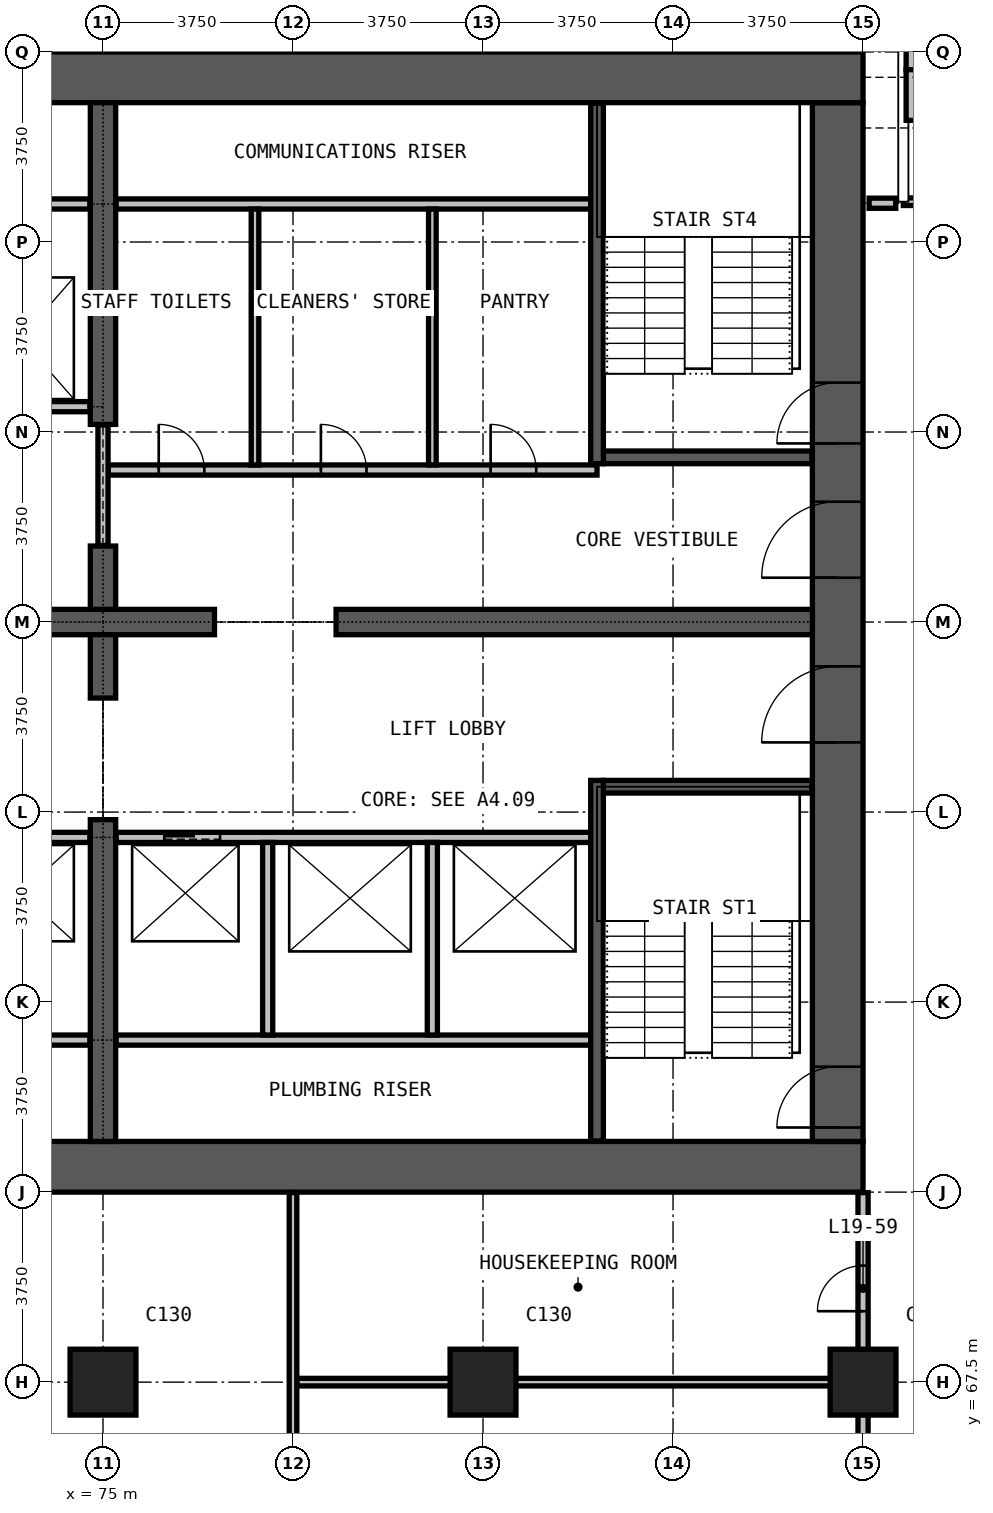
"""IFC4 building model, lengths in metres.
Left out: names, types, materials, properties, quantities, classifications, styles, units other than length and angle.
Written with IfcOpenShell. Run it as: python <this file> out.ifc"""

import sys

from ifc_helpers import new_model, si_unit, direction, frame, frame_2d, origin, origin_2d, place, context, subcontext, project, spatial, rectangle, extrude, element, fill, save


model = new_model("IFC4")
c1 = context("Model", 3, precision=1e-05, world=origin(), true_north=direction((0.0, 1.0)))
c2 = subcontext(c1, "Body", "Model", "MODEL_VIEW")
j1 = project(units=[si_unit("LENGTHUNIT", "METRE"), si_unit("PLANEANGLEUNIT", "RADIAN")], contexts=[c1])
p1 = place(None, origin())
s1 = spatial("IfcSite", under=j1, at=p1, CompositionType="ELEMENT")
p2 = place(p1, origin())
s2 = spatial("IfcBuilding", under=s1, at=p2, CompositionType="ELEMENT")
p3 = place(p2, frame((0.0, 0.0, 82.4)))
s3 = spatial("IfcBuildingStorey", under=s2, at=p3, CompositionType="ELEMENT", Elevation=82.4)
for number, where, z_axis, x_axis in (
    (1, (75.0, 67.5, 0.0), (0.0, 0.0, 1.0), (1.0, 0.0, 0.0)),
    (2, (82.5, 67.5, 0.0), (0.0, 0.0, 1.0), (1.0, 0.0, 0.0)),
    (3, (90.0, 67.5, 0.0), (0.0, 0.0, 1.0), (1.0, 0.0, 0.0)),
):
    element("IfcColumn", number, at=place(p3, frame(where, z_axis=z_axis, x_axis=x_axis)), inside=s3, PredefinedType="COLUMN", context=c2, shape_type="SweptSolid", body=[
        extrude(rectangle(XDim=1.3, YDim=1.3, at=origin_2d()), origin(), (0.0, 0.0, 1.0), 3.3),
    ])
p4 = place(p3, frame((60.0, 71.75, 0.0), z_axis=(0.0, 0.0, 1.0), x_axis=(1.0, 0.0, 0.0)))
e4 = element("IfcWall", 4, at=p4, inside=s3, PredefinedType="SHEAR", context=c2, shape_type="SweptSolid", body=[
    extrude(rectangle(XDim=30.0, YDim=1.0, at=frame_2d((15.0, 0.0))), origin(), (0.0, 0.0, 1.0), 3.3),
])
p5 = place(p3, frame((89.5, 72.25, 0.0), z_axis=(0.0, 0.0, 1.0), x_axis=(0.0, 1.0, 0.0)))
e5 = element("IfcWall", 5, at=p5, inside=s3, PredefinedType="SHEAR", context=c2, shape_type="SweptSolid", body=[
    extrude(rectangle(XDim=20.5, YDim=1.0, at=frame_2d((10.25, 0.0))), origin(), (0.0, 0.0, 1.0), 3.3),
])
p6 = place(p5, frame((0.275, 0.0, 0.0)))
e6 = element("IfcOpeningElement", 6, at=p6, cuts=e5, PredefinedType="OPENING", context=c2, shape_type="SweptSolid", body=[
    extrude(rectangle(XDim=1.2, YDim=2.2, at=frame_2d((0.6, 1.1))), frame((0.0, 0.51, 0.0), z_axis=(0.0, -1.0, 0.0), x_axis=(1.0, 0.0, 0.0)), (0.0, 0.0, 1.0), 1.02),
])
p7 = place(p5, frame((13.775, 0.0, 0.0)))
e7 = element("IfcOpeningElement", 7, at=p7, cuts=e5, PredefinedType="OPENING", context=c2, shape_type="SweptSolid", body=[
    extrude(rectangle(XDim=1.2, YDim=2.2, at=frame_2d((0.6, 1.1))), frame((0.0, 0.51, 0.0), z_axis=(0.0, -1.0, 0.0), x_axis=(1.0, 0.0, 0.0)), (0.0, 0.0, 1.0), 1.02),
])
p8 = place(p5, frame((7.875, 0.0, 0.0)))
e8 = element("IfcOpeningElement", 8, at=p8, cuts=e5, PredefinedType="OPENING", context=c2, shape_type="SweptSolid", body=[
    extrude(rectangle(XDim=1.5, YDim=2.2, at=frame_2d((0.75, 1.1))), frame((0.0, 0.51, 0.0), z_axis=(0.0, -1.0, 0.0), x_axis=(1.0, 0.0, 0.0)), (0.0, 0.0, 1.0), 1.02),
])
p9 = place(p5, frame((11.125, 0.0, 0.0)))
e9 = element("IfcOpeningElement", 9, at=p9, cuts=e5, PredefinedType="OPENING", context=c2, shape_type="SweptSolid", body=[
    extrude(rectangle(XDim=1.5, YDim=2.2, at=frame_2d((0.75, 1.1))), frame((0.0, 0.51, 0.0), z_axis=(0.0, -1.0, 0.0), x_axis=(1.0, 0.0, 0.0)), (0.0, 0.0, 1.0), 1.02),
])
p10 = place(p3, frame((90.0, 93.25, 0.0), z_axis=(0.0, 0.0, 1.0), x_axis=(-1.0, 0.0, 0.0)))
e10 = element("IfcWall", 10, at=p10, inside=s3, PredefinedType="SHEAR", context=c2, shape_type="SweptSolid", body=[
    extrude(rectangle(XDim=30.0, YDim=1.0, at=frame_2d((15.0, 0.0))), origin(), (0.0, 0.0, 1.0), 3.3),
])
p11 = place(p3, frame((72.8, 82.5, 0.0), z_axis=(0.0, 0.0, 1.0), x_axis=(1.0, 0.0, 0.0)))
e11 = element("IfcWall", 11, at=p11, inside=s3, PredefinedType="SHEAR", context=c2, shape_type="SweptSolid", body=[
    extrude(rectangle(XDim=4.4, YDim=0.5, at=frame_2d((2.2, 0.0))), origin(), (0.0, 0.0, 1.0), 3.3),
])
p12 = place(p3, frame((79.6, 82.5, 0.0), z_axis=(0.0, 0.0, 1.0), x_axis=(1.0, 0.0, 0.0)))
e12 = element("IfcWall", 12, at=p12, inside=s3, PredefinedType="SHEAR", context=c2, shape_type="SweptSolid", body=[
    extrude(rectangle(XDim=9.4, YDim=0.5, at=frame_2d((4.7, 0.0))), origin(), (0.0, 0.0, 1.0), 3.3),
])
p13 = place(p3, frame((75.0, 72.25, 0.0), z_axis=(0.0, 0.0, 1.0), x_axis=(0.0, 1.0, 0.0)))
e13 = element("IfcWall", 13, at=p13, inside=s3, PredefinedType="SHEAR", context=c2, shape_type="SweptSolid", body=[
    extrude(rectangle(XDim=6.35, YDim=0.5, at=frame_2d((3.175, 0.0))), origin(), (0.0, 0.0, 1.0), 3.3),
])
for number, where, z_axis, x_axis in (
    (14, (75.0, 81.0, 0.0), (0.0, 0.0, 1.0), (0.0, 1.0, 0.0)),
    (15, (75.0, 82.75, 0.0), (0.0, 0.0, 1.0), (0.0, 1.0, 0.0)),
):
    element("IfcWall", number, at=place(p3, frame(where, z_axis=z_axis, x_axis=x_axis)), inside=s3, PredefinedType="SHEAR", context=c2, shape_type="SweptSolid", body=[
        extrude(rectangle(XDim=1.25, YDim=0.5, at=frame_2d((0.625, 0.0))), origin(), (0.0, 0.0, 1.0), 3.3),
    ])
p14 = place(p3, frame((75.0, 86.4, 0.0), z_axis=(0.0, 0.0, 1.0), x_axis=(0.0, 1.0, 0.0)))
e16 = element("IfcWall", 16, at=p14, inside=s3, PredefinedType="SHEAR", context=c2, shape_type="SweptSolid", body=[
    extrude(rectangle(XDim=6.35, YDim=0.5, at=frame_2d((3.175, 0.0))), origin(), (0.0, 0.0, 1.0), 3.3),
])
p15 = place(p3, frame((90.795, 90.795, 0.0), z_axis=(0.0, 0.0, 1.0), x_axis=(1.0, 0.0, 0.0)))
e17 = element("IfcWall", 17, at=p15, inside=s3, PredefinedType="SOLIDWALL", context=c2, shape_type="SweptSolid", body=[
    extrude(rectangle(XDim=2.955, YDim=0.15, at=frame_2d((1.478, 0.0))), origin(), (0.0, 0.0, 1.0), 3.0),
])
p16 = place(p15, frame((0.877, 0.0, 0.0)))
e18 = element("IfcOpeningElement", 18, at=p16, cuts=e17, PredefinedType="OPENING", context=c2, shape_type="SweptSolid", body=[
    extrude(rectangle(XDim=1.2, YDim=2.4, at=frame_2d((0.6, 1.2))), frame((0.0, 0.085, 0.0), z_axis=(0.0, -1.0, 0.0), x_axis=(1.0, 0.0, 0.0)), (0.0, 0.0, 1.0), 0.17),
])
p17 = place(p3, frame((90.85, 93.625, 0.0), z_axis=(0.0, 0.0, 1.0), x_axis=(1.0, 0.0, 0.0)))
e19 = element("IfcWall", 19, at=p17, inside=s3, PredefinedType="USERDEFINED", context=c2, shape_type="SweptSolid", body=[
    extrude(rectangle(XDim=3.2, YDim=0.45, at=frame_2d((1.6, 0.0))), origin(), (0.0, 0.0, 1.0), 1.1),
])
p18 = place(p3, frame((91.075, 92.4, 0.0), z_axis=(0.0, 0.0, 1.0), x_axis=(0.0, 1.0, 0.0)))
e20 = element("IfcWall", 20, at=p18, inside=s3, PredefinedType="USERDEFINED", context=c2, shape_type="SweptSolid", body=[
    extrude(rectangle(XDim=1.0, YDim=0.45, at=frame_2d((0.5, 0.0))), origin(), (0.0, 0.0, 1.0), 1.1),
])
p19 = place(p3, frame((75.1, 85.5, 0.0), z_axis=(0.0, 0.0, 1.0), x_axis=(1.0, 0.0, 0.0)))
e21 = element("IfcWall", 21, at=p19, inside=s3, PredefinedType="PARTITIONING", context=c2, shape_type="SweptSolid", body=[
    extrude(rectangle(XDim=9.65, YDim=0.2, at=frame_2d((4.825, 0.0))), origin(), (0.0, 0.0, 1.0), 3.0),
])
p20 = place(p19, frame((1.0, 0.0, 0.0)))
e22 = element("IfcOpeningElement", 22, at=p20, cuts=e21, PredefinedType="OPENING", context=c2, shape_type="SweptSolid", body=[
    extrude(rectangle(XDim=0.9, YDim=2.2, at=frame_2d((0.45, 1.1))), frame((0.0, 0.11, 0.0), z_axis=(0.0, -1.0, 0.0), x_axis=(1.0, 0.0, 0.0)), (0.0, 0.0, 1.0), 0.22),
])
p21 = place(p19, frame((4.2, 0.0, 0.0)))
e23 = element("IfcOpeningElement", 23, at=p21, cuts=e21, PredefinedType="OPENING", context=c2, shape_type="SweptSolid", body=[
    extrude(rectangle(XDim=0.9, YDim=2.2, at=frame_2d((0.45, 1.1))), frame((0.0, 0.11, 0.0), z_axis=(0.0, -1.0, 0.0), x_axis=(1.0, 0.0, 0.0)), (0.0, 0.0, 1.0), 0.22),
])
p22 = place(p19, frame((7.55, 0.0, 0.0)))
e24 = element("IfcOpeningElement", 24, at=p22, cuts=e21, PredefinedType="OPENING", context=c2, shape_type="SweptSolid", body=[
    extrude(rectangle(XDim=0.9, YDim=2.2, at=frame_2d((0.45, 1.1))), frame((0.0, 0.11, 0.0), z_axis=(0.0, -1.0, 0.0), x_axis=(1.0, 0.0, 0.0)), (0.0, 0.0, 1.0), 0.22),
])
p23 = place(p3, frame((75.26, 90.75, 0.0), z_axis=(0.0, 0.0, 1.0), x_axis=(1.0, 0.0, 0.0)))
e25 = element("IfcWall", 25, at=p23, inside=s3, PredefinedType="PARTITIONING", context=c2, shape_type="SweptSolid", body=[
    extrude(rectangle(XDim=9.365, YDim=0.2, at=frame_2d((4.683, 0.0))), origin(), (0.0, 0.0, 1.0), 3.0),
])
p24 = place(p3, frame((75.0, 84.01, 0.0), z_axis=(0.0, 0.0, 1.0), x_axis=(0.0, 1.0, 0.0)))
e26 = element("IfcWall", 26, at=p24, inside=s3, PredefinedType="PARTITIONING", context=c2, shape_type="SweptSolid", body=[
    extrude(rectangle(XDim=2.38, YDim=0.2, at=frame_2d((1.19, 0.0))), origin(), (0.0, 0.0, 1.0), 2.4),
])
p25 = place(p3, frame((90.12, 90.765, 0.0), z_axis=(0.0, 0.0, 1.0), x_axis=(1.0, 0.0, 0.0)))
e27 = element("IfcWall", 27, at=p25, inside=s3, PredefinedType="PARTITIONING", context=c2, shape_type="SweptSolid", body=[
    extrude(rectangle(XDim=0.525, YDim=0.2, at=frame_2d((0.262, 0.0))), origin(), (0.0, 0.0, 1.0), 3.0),
])
p26 = place(p3, frame((90.0, 52.4, 0.0), z_axis=(0.0, 0.0, 1.0), x_axis=(0.0, 1.0, 0.0)))
e28 = element("IfcWall", 28, at=p26, inside=s3, PredefinedType="PARTITIONING", context=c2, shape_type="SweptSolid", body=[
    extrude(rectangle(XDim=18.84, YDim=0.2, at=frame_2d((9.42, 0.0))), origin(), (0.0, 0.0, 1.0), 3.0),
])
p27 = place(p26, frame((10.85, 0.0, 0.0)))
e29 = element("IfcOpeningElement", 29, at=p27, cuts=e28, PredefinedType="OPENING", context=c2, shape_type="SweptSolid", body=[
    extrude(rectangle(XDim=1.0, YDim=2.2, at=frame_2d((0.5, 1.1))), frame((0.0, 0.11, 0.0), z_axis=(0.0, -1.0, 0.0), x_axis=(1.0, 0.0, 0.0)), (0.0, 0.0, 1.0), 0.22),
])
p28 = place(p26, frame((16.5, 0.0, 0.0)))
e30 = element("IfcOpeningElement", 30, at=p28, cuts=e28, PredefinedType="OPENING", context=c2, shape_type="SweptSolid", body=[
    extrude(rectangle(XDim=0.9, YDim=2.2, at=frame_2d((0.45, 1.1))), frame((0.0, 0.11, 0.0), z_axis=(0.0, -1.0, 0.0), x_axis=(1.0, 0.0, 0.0)), (0.0, 0.0, 1.0), 0.22),
])
p29 = place(p3, frame((78.825, 67.5, 0.0), z_axis=(0.0, 0.0, 1.0), x_axis=(1.0, 0.0, 0.0)))
e31 = element("IfcWall", 31, at=p29, inside=s3, PredefinedType="PARTITIONING", context=c2, shape_type="SweptSolid", body=[
    extrude(rectangle(XDim=11.075, YDim=0.15, at=frame_2d((5.538, 0.0))), origin(), (0.0, 0.0, 1.0), 3.0),
])
p30 = place(p3, frame((78.0, 85.6, 0.0), z_axis=(0.0, 0.0, 1.0), x_axis=(0.0, 1.0, 0.0)))
e32 = element("IfcWall", 32, at=p30, inside=s3, PredefinedType="PARTITIONING", context=c2, shape_type="SweptSolid", body=[
    extrude(rectangle(XDim=5.05, YDim=0.15, at=frame_2d((2.525, 0.0))), origin(), (0.0, 0.0, 1.0), 3.0),
])
p31 = place(p3, frame((78.75, 52.6, 0.0), z_axis=(0.0, 0.0, 1.0), x_axis=(0.0, 1.0, 0.0)))
e33 = element("IfcWall", 33, at=p31, inside=s3, PredefinedType="PARTITIONING", context=c2, shape_type="SweptSolid", body=[
    extrude(rectangle(XDim=18.64, YDim=0.15, at=frame_2d((9.32, 0.0))), origin(), (0.0, 0.0, 1.0), 3.0),
])
p32 = place(p3, frame((81.5, 85.6, 0.0), z_axis=(0.0, 0.0, 1.0), x_axis=(0.0, 1.0, 0.0)))
e34 = element("IfcWall", 34, at=p32, inside=s3, PredefinedType="PARTITIONING", context=c2, shape_type="SweptSolid", body=[
    extrude(rectangle(XDim=5.05, YDim=0.15, at=frame_2d((2.525, 0.0))), origin(), (0.0, 0.0, 1.0), 3.0),
])
for number, where, z_axis, x_axis in (
    (35, (65.375, 74.25, 0.0), (0.0, 0.0, 1.0), (1.0, 0.0, 0.0)),
    (36, (75.26, 74.25, 0.0), (0.0, 0.0, 1.0), (1.0, 0.0, 0.0)),
):
    element("IfcWall", number, at=place(p3, frame(where, z_axis=z_axis, x_axis=x_axis)), inside=s3, PredefinedType="PARTITIONING", context=c2, shape_type="SweptSolid", body=[
        extrude(rectangle(XDim=9.365, YDim=0.2, at=frame_2d((4.683, 0.0))), origin(), (0.0, 0.0, 1.0), 3.0),
    ])
p33 = place(p3, frame((65.375, 78.25, 0.0), z_axis=(0.0, 0.0, 1.0), x_axis=(1.0, 0.0, 0.0)))
e37 = element("IfcWall", 37, at=p33, inside=s3, PredefinedType="PARTITIONING", context=c2, shape_type="SweptSolid", body=[
    extrude(rectangle(XDim=9.365, YDim=0.2, at=frame_2d((4.683, 0.0))), origin(), (0.0, 0.0, 1.0), 3.0),
])
p34 = place(p33, frame((1.0, 0.0, 0.0)))
e38 = element("IfcOpeningElement", 38, at=p34, cuts=e37, PredefinedType="OPENING", context=c2, shape_type="SweptSolid", body=[
    extrude(rectangle(XDim=1.1, YDim=2.2, at=frame_2d((0.55, 1.1))), frame((0.0, 0.11, 0.0), z_axis=(0.0, -1.0, 0.0), x_axis=(1.0, 0.0, 0.0)), (0.0, 0.0, 1.0), 0.22),
])
p35 = place(p33, frame((4.175, 0.0, 0.0)))
e39 = element("IfcOpeningElement", 39, at=p35, cuts=e37, PredefinedType="OPENING", context=c2, shape_type="SweptSolid", body=[
    extrude(rectangle(XDim=1.1, YDim=2.2, at=frame_2d((0.55, 1.1))), frame((0.0, 0.11, 0.0), z_axis=(0.0, -1.0, 0.0), x_axis=(1.0, 0.0, 0.0)), (0.0, 0.0, 1.0), 0.22),
])
p36 = place(p33, frame((7.325, 0.0, 0.0)))
e40 = element("IfcOpeningElement", 40, at=p36, cuts=e37, PredefinedType="OPENING", context=c2, shape_type="SweptSolid", body=[
    extrude(rectangle(XDim=1.1, YDim=2.2, at=frame_2d((0.55, 1.1))), frame((0.0, 0.11, 0.0), z_axis=(0.0, -1.0, 0.0), x_axis=(1.0, 0.0, 0.0)), (0.0, 0.0, 1.0), 0.22),
])
p37 = place(p3, frame((75.26, 78.25, 0.0), z_axis=(0.0, 0.0, 1.0), x_axis=(1.0, 0.0, 0.0)))
e41 = element("IfcWall", 41, at=p37, inside=s3, PredefinedType="PARTITIONING", context=c2, shape_type="SweptSolid", body=[
    extrude(rectangle(XDim=9.365, YDim=0.2, at=frame_2d((4.683, 0.0))), origin(), (0.0, 0.0, 1.0), 3.0),
])
p38 = place(p37, frame((0.95, 0.0, 0.0)))
e42 = element("IfcOpeningElement", 42, at=p38, cuts=e41, PredefinedType="OPENING", context=c2, shape_type="SweptSolid", body=[
    extrude(rectangle(XDim=1.1, YDim=2.2, at=frame_2d((0.55, 1.1))), frame((0.0, 0.11, 0.0), z_axis=(0.0, -1.0, 0.0), x_axis=(1.0, 0.0, 0.0)), (0.0, 0.0, 1.0), 0.22),
])
p39 = place(p3, frame((65.375, 86.75, 0.0), z_axis=(0.0, 0.0, 1.0), x_axis=(1.0, 0.0, 0.0)))
e43 = element("IfcWall", 43, at=p39, inside=s3, PredefinedType="PARTITIONING", context=c2, shape_type="SweptSolid", body=[
    extrude(rectangle(XDim=9.365, YDim=0.2, at=frame_2d((4.683, 0.0))), origin(), (0.0, 0.0, 1.0), 3.0),
])
p40 = place(p39, frame((1.0, 0.0, 0.0)))
e44 = element("IfcOpeningElement", 44, at=p40, cuts=e43, PredefinedType="OPENING", context=c2, shape_type="SweptSolid", body=[
    extrude(rectangle(XDim=1.1, YDim=2.2, at=frame_2d((0.55, 1.1))), frame((0.0, 0.11, 0.0), z_axis=(0.0, -1.0, 0.0), x_axis=(1.0, 0.0, 0.0)), (0.0, 0.0, 1.0), 0.22),
])
p41 = place(p39, frame((4.175, 0.0, 0.0)))
e45 = element("IfcOpeningElement", 45, at=p41, cuts=e43, PredefinedType="OPENING", context=c2, shape_type="SweptSolid", body=[
    extrude(rectangle(XDim=1.1, YDim=2.2, at=frame_2d((0.55, 1.1))), frame((0.0, 0.11, 0.0), z_axis=(0.0, -1.0, 0.0), x_axis=(1.0, 0.0, 0.0)), (0.0, 0.0, 1.0), 0.22),
])
p42 = place(p39, frame((7.325, 0.0, 0.0)))
e46 = element("IfcOpeningElement", 46, at=p42, cuts=e43, PredefinedType="OPENING", context=c2, shape_type="SweptSolid", body=[
    extrude(rectangle(XDim=1.1, YDim=2.2, at=frame_2d((0.55, 1.1))), frame((0.0, 0.11, 0.0), z_axis=(0.0, -1.0, 0.0), x_axis=(1.0, 0.0, 0.0)), (0.0, 0.0, 1.0), 0.22),
])
p43 = place(p3, frame((65.375, 90.75, 0.0), z_axis=(0.0, 0.0, 1.0), x_axis=(1.0, 0.0, 0.0)))
e47 = element("IfcWall", 47, at=p43, inside=s3, PredefinedType="PARTITIONING", context=c2, shape_type="SweptSolid", body=[
    extrude(rectangle(XDim=9.365, YDim=0.2, at=frame_2d((4.683, 0.0))), origin(), (0.0, 0.0, 1.0), 3.0),
])
for number, where, z_axis, x_axis in (
    (48, (78.25, 74.35, 0.0), (0.0, 0.0, 1.0), (0.0, 1.0, 0.0)),
    (49, (81.5, 74.35, 0.0), (0.0, 0.0, 1.0), (0.0, 1.0, 0.0)),
):
    element("IfcWall", number, at=place(p3, frame(where, z_axis=z_axis, x_axis=x_axis)), inside=s3, PredefinedType="PARTITIONING", context=c2, shape_type="SweptSolid", body=[
        extrude(rectangle(XDim=3.8, YDim=0.2, at=frame_2d((1.9, 0.0))), origin(), (0.0, 0.0, 1.0), 3.0),
    ])
for number, where, z_axis, x_axis in (
    (50, (84.875, 79.25, 0.0), (0.0, 0.0, 1.0), (1.0, 0.0, 0.0)),
    (51, (84.875, 85.75, 0.0), (0.0, 0.0, 1.0), (1.0, 0.0, 0.0)),
):
    element("IfcWall", number, at=place(p3, frame(where, z_axis=z_axis, x_axis=x_axis)), inside=s3, PredefinedType="PARTITIONING", context=c2, shape_type="SweptSolid", body=[
        extrude(rectangle(XDim=4.115, YDim=0.25, at=frame_2d((2.058, 0.0))), origin(), (0.0, 0.0, 1.0), 3.0),
    ])
for number, where, z_axis, x_axis in (
    (52, (84.75, 72.26, 0.0), (0.0, 0.0, 1.0), (0.0, 1.0, 0.0)),
    (53, (84.75, 85.625, 0.0), (0.0, 0.0, 1.0), (0.0, 1.0, 0.0)),
):
    element("IfcWall", number, at=place(p3, frame(where, z_axis=z_axis, x_axis=x_axis)), inside=s3, PredefinedType="PARTITIONING", context=c2, shape_type="SweptSolid", body=[
        extrude(rectangle(XDim=7.115, YDim=0.25, at=frame_2d((3.558, 0.0))), origin(), (0.0, 0.0, 1.0), 3.0),
    ])
p44 = place(p38, origin())
e54 = element("IfcDoor", 54, at=p44, inside=s3, OperationType="DOUBLE_DOOR_SLIDING", PredefinedType="DOOR", context=c2, shape_type="SweptSolid", body=[
    extrude(rectangle(XDim=1.1, YDim=2.2, at=frame_2d((0.55, 1.1))), frame((0.0, 0.025, 0.0), z_axis=(0.0, -1.0, 0.0), x_axis=(1.0, 0.0, 0.0)), (0.0, 0.0, 1.0), 0.05),
])
fill(e42, e54)
p45 = place(p6, origin())
e55 = element("IfcDoor", 55, at=p45, inside=s3, OperationType="SINGLE_SWING_LEFT", PredefinedType="DOOR", context=c2, shape_type="SweptSolid", body=[
    extrude(rectangle(XDim=1.2, YDim=2.2, at=frame_2d((0.6, 1.1))), frame((0.0, 0.025, 0.0), z_axis=(0.0, -1.0, 0.0), x_axis=(1.0, 0.0, 0.0)), (0.0, 0.0, 1.0), 0.05),
])
fill(e6, e55)
p46 = place(p7, origin())
e56 = element("IfcDoor", 56, at=p46, inside=s3, OperationType="SINGLE_SWING_RIGHT", PredefinedType="DOOR", context=c2, shape_type="SweptSolid", body=[
    extrude(rectangle(XDim=1.2, YDim=2.2, at=frame_2d((0.6, 1.1))), frame((0.0, 0.025, 0.0), z_axis=(0.0, -1.0, 0.0), x_axis=(1.0, 0.0, 0.0)), (0.0, 0.0, 1.0), 0.05),
])
fill(e7, e56)
p47 = place(p8, origin())
e57 = element("IfcDoor", 57, at=p47, inside=s3, OperationType="DOUBLE_DOOR_SINGLE_SWING", PredefinedType="DOOR", context=c2, shape_type="SweptSolid", body=[
    extrude(rectangle(XDim=1.5, YDim=2.2, at=frame_2d((0.75, 1.1))), frame((0.0, 0.025, 0.0), z_axis=(0.0, -1.0, 0.0), x_axis=(1.0, 0.0, 0.0)), (0.0, 0.0, 1.0), 0.05),
])
fill(e8, e57)
p48 = place(p9, origin())
e58 = element("IfcDoor", 58, at=p48, inside=s3, OperationType="DOUBLE_DOOR_SINGLE_SWING", PredefinedType="DOOR", context=c2, shape_type="SweptSolid", body=[
    extrude(rectangle(XDim=1.5, YDim=2.2, at=frame_2d((0.75, 1.1))), frame((0.0, 0.025, 0.0), z_axis=(0.0, -1.0, 0.0), x_axis=(1.0, 0.0, 0.0)), (0.0, 0.0, 1.0), 0.05),
])
fill(e9, e58)
p49 = place(p20, origin())
e59 = element("IfcDoor", 59, at=p49, inside=s3, OperationType="SINGLE_SWING_LEFT", PredefinedType="DOOR", context=c2, shape_type="SweptSolid", body=[
    extrude(rectangle(XDim=0.9, YDim=2.2, at=frame_2d((0.45, 1.1))), frame((0.0, 0.025, 0.0), z_axis=(0.0, -1.0, 0.0), x_axis=(1.0, 0.0, 0.0)), (0.0, 0.0, 1.0), 0.05),
])
fill(e22, e59)
p50 = place(p21, origin())
e60 = element("IfcDoor", 60, at=p50, inside=s3, OperationType="SINGLE_SWING_RIGHT", PredefinedType="DOOR", context=c2, shape_type="SweptSolid", body=[
    extrude(rectangle(XDim=0.9, YDim=2.2, at=frame_2d((0.45, 1.1))), frame((0.0, 0.025, 0.0), z_axis=(0.0, -1.0, 0.0), x_axis=(1.0, 0.0, 0.0)), (0.0, 0.0, 1.0), 0.05),
])
fill(e23, e60)
p51 = place(p22, origin())
e61 = element("IfcDoor", 61, at=p51, inside=s3, OperationType="SINGLE_SWING_RIGHT", PredefinedType="DOOR", context=c2, shape_type="SweptSolid", body=[
    extrude(rectangle(XDim=0.9, YDim=2.2, at=frame_2d((0.45, 1.1))), frame((0.0, 0.025, 0.0), z_axis=(0.0, -1.0, 0.0), x_axis=(1.0, 0.0, 0.0)), (0.0, 0.0, 1.0), 0.05),
])
fill(e24, e61)
p52 = place(p28, origin())
e62 = element("IfcDoor", 62, at=p52, inside=s3, OperationType="SINGLE_SWING_LEFT", PredefinedType="DOOR", context=c2, shape_type="SweptSolid", body=[
    extrude(rectangle(XDim=0.9, YDim=2.2, at=frame_2d((0.45, 1.1))), frame((0.0, 0.025, 0.0), z_axis=(0.0, -1.0, 0.0), x_axis=(1.0, 0.0, 0.0)), (0.0, 0.0, 1.0), 0.05),
])
fill(e30, e62)
save(model, sys.argv[1])
